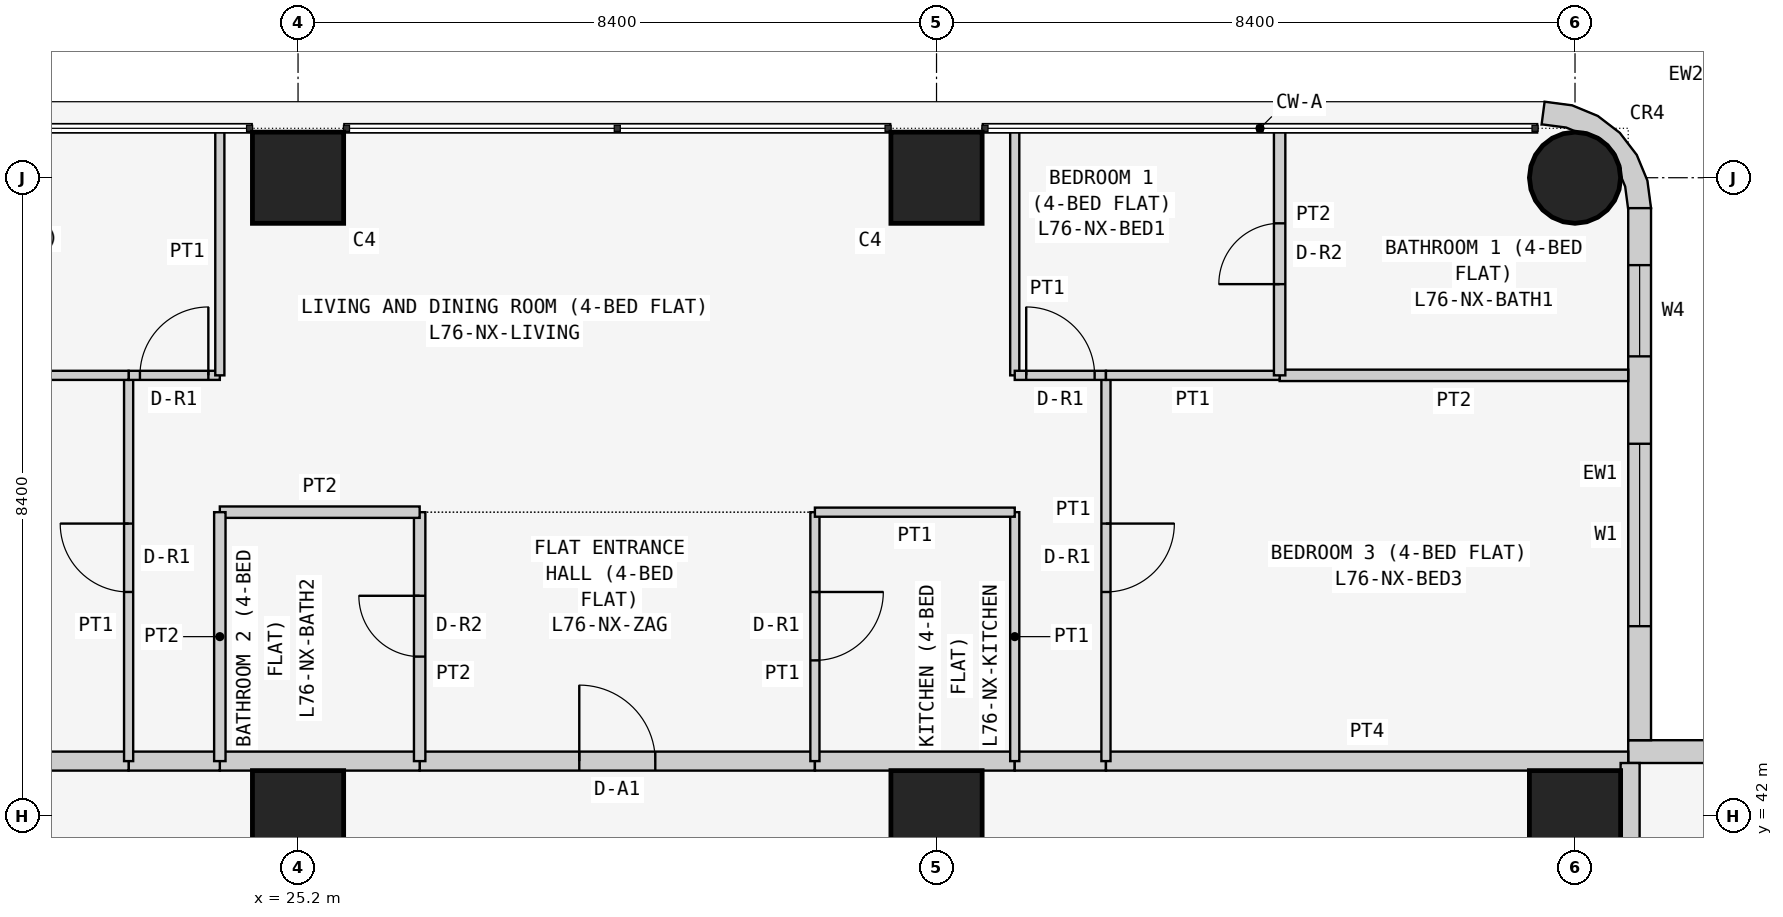
"""IFC4 building model, lengths in metres.
Left out: names, types, materials, properties, quantities, classifications, styles, units other than length and angle.
Written with IfcOpenShell. Run it as: python <this file> out.ifc"""

import sys

from ifc_helpers import new_model, si_unit, direction, frame, frame_2d, origin, origin_2d, place, context, subcontext, project, spatial, polyline, rectangle, circle, outline, extrude, element, fill, save


model = new_model("IFC4")
c1 = context("Model", 3, precision=1e-05, world=origin(), true_north=direction((0.0, 1.0)))
c2 = subcontext(c1, "Body", "Model", "MODEL_VIEW")
j1 = project(units=[si_unit("LENGTHUNIT", "METRE"), si_unit("PLANEANGLEUNIT", "RADIAN")], contexts=[c1])
p1 = place(None, origin())
s1 = spatial("IfcSite", under=j1, at=p1, CompositionType="ELEMENT")
p2 = place(p1, origin())
s2 = spatial("IfcBuilding", under=s1, at=p2, CompositionType="ELEMENT")
p3 = place(p2, frame((0.0, 0.0, 290.1)))
s3 = spatial("IfcBuildingStorey", under=s2, at=p3, CompositionType="ELEMENT", Elevation=290.1)
for number, where, z_axis, x_axis in (
    (1, (25.2, 42.0, 0.0), (0.0, 0.0, 1.0), (1.0, 0.0, 0.0)),
    (2, (25.2, 50.4, 0.0), (0.0, 0.0, 1.0), (1.0, 0.0, 0.0)),
    (3, (33.6, 42.0, 0.0), (0.0, 0.0, 1.0), (1.0, 0.0, 0.0)),
    (4, (33.6, 50.4, 0.0), (0.0, 0.0, 1.0), (1.0, 0.0, 0.0)),
    (5, (42.0, 42.0, 0.0), (0.0, 0.0, 1.0), (1.0, 0.0, 0.0)),
):
    element("IfcColumn", number, at=place(p3, frame(where, z_axis=z_axis, x_axis=x_axis)), inside=s3, PredefinedType="COLUMN", context=c2, shape_type="SweptSolid", body=[
        extrude(rectangle(XDim=1.2, YDim=1.2, at=origin_2d()), origin(), (0.0, 0.0, 1.0), 3.6),
    ])
p4 = place(p3, frame((42.0, 50.4, 0.0), z_axis=(0.0, 0.0, 1.0), x_axis=(1.0, 0.0, 0.0)))
e6 = element("IfcColumn", 6, at=p4, inside=s3, PredefinedType="COLUMN", context=c2, shape_type="SweptSolid", body=[
    extrude(circle(Radius=0.6, at=origin_2d()), origin(), (0.0, 0.0, 1.0), 3.6),
])
p5 = place(p3, frame((50.0, 42.85, 0.0), z_axis=(0.0, 0.0, 1.0), x_axis=(-1.0, 0.0, 0.0)))
e7 = element("IfcWall", 7, at=p5, inside=s3, PredefinedType="SOLIDWALL", context=c2, shape_type="SweptSolid", body=[
    extrude(rectangle(XDim=7.3, YDim=0.3, at=frame_2d((3.65, 0.0))), origin(), (0.0, 0.0, 1.0), 3.45),
])
p6 = place(p5, frame((3.1, 0.0, 0.9)))
e8 = element("IfcOpeningElement", 8, at=p6, cuts=e7, PredefinedType="OPENING", context=c2, shape_type="SweptSolid", body=[
    extrude(rectangle(XDim=2.4, YDim=1.5, at=frame_2d((1.2, 0.75))), frame((0.0, 0.16, 0.0), z_axis=(0.0, -1.0, 0.0), x_axis=(1.0, 0.0, 0.0)), (0.0, 0.0, 1.0), 0.32),
])
p7 = place(p5, frame((0.75, 0.0, 0.9)))
e9 = element("IfcOpeningElement", 9, at=p7, cuts=e7, PredefinedType="OPENING", context=c2, shape_type="SweptSolid", body=[
    extrude(rectangle(XDim=1.2, YDim=1.5, at=frame_2d((0.6, 0.75))), frame((0.0, 0.16, 0.0), z_axis=(0.0, -1.0, 0.0), x_axis=(1.0, 0.0, 0.0)), (0.0, 0.0, 1.0), 0.32),
])
p8 = place(p3, frame((42.85, 43.0, 0.0), z_axis=(0.0, 0.0, 1.0), x_axis=(0.0, 1.0, 0.0)))
e10 = element("IfcWall", 10, at=p8, inside=s3, PredefinedType="SOLIDWALL", context=c2, shape_type="SweptSolid", body=[
    extrude(rectangle(XDim=7.0, YDim=0.3, at=frame_2d((3.5, 0.0))), origin(), (0.0, 0.0, 1.0), 3.45),
])
p9 = place(p8, frame((1.5, 0.0, 0.9)))
e11 = element("IfcOpeningElement", 11, at=p9, cuts=e10, PredefinedType="OPENING", context=c2, shape_type="SweptSolid", body=[
    extrude(rectangle(XDim=2.4, YDim=1.5, at=frame_2d((1.2, 0.75))), frame((0.0, 0.16, 0.0), z_axis=(0.0, -1.0, 0.0), x_axis=(1.0, 0.0, 0.0)), (0.0, 0.0, 1.0), 0.32),
])
p10 = place(p8, frame((5.05, 0.0, 0.9)))
e12 = element("IfcOpeningElement", 12, at=p10, cuts=e10, PredefinedType="OPENING", context=c2, shape_type="SweptSolid", body=[
    extrude(rectangle(XDim=1.2, YDim=1.5, at=frame_2d((0.6, 0.75))), frame((0.0, 0.16, 0.0), z_axis=(0.0, -1.0, 0.0), x_axis=(1.0, 0.0, 0.0)), (0.0, 0.0, 1.0), 0.32),
])
p11 = place(p3, frame((42.576, 50.038, 0.0), z_axis=(0.0, 0.0, 1.0), x_axis=(0.707106781187, 0.707106781187, 0.0)))
e13 = element("IfcWall", 13, at=p11, inside=s3, PredefinedType="SOLIDWALL", context=c2, shape_type="SweptSolid", body=[
    extrude(outline(polyline([(0.233, 0.114), (0.047, -0.129), (0.033, -0.143), (0.273, -0.327), (0.495, -0.037), (0.635, 0.3), (0.683, 0.663), (0.635, 1.025), (0.495, 1.363), (0.273, 1.653), (0.033, 1.469), (0.047, 1.455), (0.233, 1.212), (0.292, 1.069), (0.358, 1.003), (0.449, 0.782), (0.449, 0.543), (0.358, 0.322), (0.292, 0.257), (0.233, 0.114)])), origin(), (0.0, 0.0, 1.0), 3.45),
])
p12 = place(p3, frame((26.8, 42.725, 0.0), z_axis=(0.0, 0.0, 1.0), x_axis=(1.0, 0.0, 0.0)))
e14 = element("IfcWall", 14, at=p12, inside=s3, PredefinedType="PARTITIONING", context=c2, shape_type="SweptSolid", body=[
    extrude(rectangle(XDim=5.2, YDim=0.25, at=frame_2d((2.6, 0.0))), origin(), (0.0, 0.0, 1.0), 3.45),
])
p13 = place(p12, frame((2.1, 0.0, 0.0)))
e15 = element("IfcOpeningElement", 15, at=p13, cuts=e14, PredefinedType="OPENING", context=c2, shape_type="SweptSolid", body=[
    extrude(rectangle(XDim=1.0, YDim=2.1, at=frame_2d((0.5, 1.05))), frame((0.0, 0.135, 0.0), z_axis=(0.0, -1.0, 0.0), x_axis=(1.0, 0.0, 0.0)), (0.0, 0.0, 1.0), 0.27),
])
p14 = place(p3, frame((24.171, 42.725, 0.0), z_axis=(0.0, 0.0, 1.0), x_axis=(1.0, 0.0, 0.0)))
e16 = element("IfcWall", 16, at=p14, inside=s3, PredefinedType="PARTITIONING", context=c2, shape_type="SweptSolid", body=[
    extrude(rectangle(XDim=2.629, YDim=0.25, at=frame_2d((1.314, 0.0))), origin(), (0.0, 0.0, 1.0), 3.45),
])
p15 = place(p3, frame((32.0, 42.725, 0.0), z_axis=(0.0, 0.0, 1.0), x_axis=(1.0, 0.0, 0.0)))
e17 = element("IfcWall", 17, at=p15, inside=s3, PredefinedType="PARTITIONING", context=c2, shape_type="SweptSolid", body=[
    extrude(rectangle(XDim=2.629, YDim=0.25, at=frame_2d((1.314, 0.0))), origin(), (0.0, 0.0, 1.0), 3.45),
])
p16 = place(p3, frame((22.971, 42.725, 0.0), z_axis=(0.0, 0.0, 1.0), x_axis=(1.0, 0.0, 0.0)))
e18 = element("IfcWall", 18, at=p16, inside=s3, PredefinedType="PARTITIONING", context=c2, shape_type="SweptSolid", body=[
    extrude(rectangle(XDim=1.2, YDim=0.25, at=frame_2d((0.6, 0.0))), origin(), (0.0, 0.0, 1.0), 3.45),
])
p17 = place(p3, frame((34.629, 42.725, 0.0), z_axis=(0.0, 0.0, 1.0), x_axis=(1.0, 0.0, 0.0)))
e19 = element("IfcWall", 19, at=p17, inside=s3, PredefinedType="PARTITIONING", context=c2, shape_type="SweptSolid", body=[
    extrude(rectangle(XDim=1.2, YDim=0.25, at=frame_2d((0.6, 0.0))), origin(), (0.0, 0.0, 1.0), 3.45),
])
for number, where, z_axis, x_axis in (
    (20, (16.1, 42.725, 0.0), (0.0, 0.0, 1.0), (1.0, 0.0, 0.0)),
    (21, (35.829, 42.725, 0.0), (0.0, 0.0, 1.0), (1.0, 0.0, 0.0)),
):
    element("IfcWall", number, at=place(p3, frame(where, z_axis=z_axis, x_axis=x_axis)), inside=s3, PredefinedType="PARTITIONING", context=c2, shape_type="SweptSolid", body=[
        extrude(rectangle(XDim=6.871, YDim=0.25, at=frame_2d((3.436, 0.0))), origin(), (0.0, 0.0, 1.0), 3.45),
    ])
p18 = place(p3, frame((42.725, 42.7, 0.0), z_axis=(0.0, 0.0, 1.0), x_axis=(0.0, -1.0, 0.0)))
e22 = element("IfcWall", 22, at=p18, inside=s3, PredefinedType="PARTITIONING", context=c2, shape_type="SweptSolid", body=[
    extrude(rectangle(XDim=4.586, YDim=0.25, at=frame_2d((2.293, 0.0))), origin(), (0.0, 0.0, 1.0), 3.45),
])
p19 = place(p3, frame((26.8, 46.0, 0.0), z_axis=(0.0, 0.0, 1.0), x_axis=(0.0, -1.0, 0.0)))
e23 = element("IfcWall", 23, at=p19, inside=s3, PredefinedType="PARTITIONING", context=c2, shape_type="SweptSolid", body=[
    extrude(rectangle(XDim=3.275, YDim=0.15, at=frame_2d((1.637, 0.0))), origin(), (0.0, 0.0, 1.0), 3.45),
])
p20 = place(p19, frame((1.1, 0.0, 0.0)))
e24 = element("IfcOpeningElement", 24, at=p20, cuts=e23, PredefinedType="OPENING", context=c2, shape_type="SweptSolid", body=[
    extrude(rectangle(XDim=0.8, YDim=2.1, at=frame_2d((0.4, 1.05))), frame((0.0, 0.085, 0.0), z_axis=(0.0, -1.0, 0.0), x_axis=(1.0, 0.0, 0.0)), (0.0, 0.0, 1.0), 0.17),
])
p21 = place(p3, frame((32.0, 42.725, 0.0), z_axis=(0.0, 0.0, 1.0), x_axis=(0.0, 1.0, 0.0)))
e25 = element("IfcWall", 25, at=p21, inside=s3, PredefinedType="PARTITIONING", context=c2, shape_type="SweptSolid", body=[
    extrude(rectangle(XDim=3.275, YDim=0.12, at=frame_2d((1.637, 0.0))), origin(), (0.0, 0.0, 1.0), 3.45),
])
p22 = place(p21, frame((1.325, 0.0, 0.0)))
e26 = element("IfcOpeningElement", 26, at=p22, cuts=e25, PredefinedType="OPENING", context=c2, shape_type="SweptSolid", body=[
    extrude(rectangle(XDim=0.9, YDim=2.1, at=frame_2d((0.45, 1.05))), frame((0.0, 0.07, 0.0), z_axis=(0.0, -1.0, 0.0), x_axis=(1.0, 0.0, 0.0)), (0.0, 0.0, 1.0), 0.14),
])
p23 = place(p3, frame((26.8, 46.0, 0.0), z_axis=(0.0, 0.0, 1.0), x_axis=(-1.0, 0.0, 0.0)))
e27 = element("IfcWall", 27, at=p23, inside=s3, PredefinedType="PARTITIONING", context=c2, shape_type="SweptSolid", body=[
    extrude(rectangle(XDim=2.629, YDim=0.15, at=frame_2d((1.314, 0.0))), origin(), (0.0, 0.0, 1.0), 3.45),
])
p24 = place(p3, frame((24.171, 46.0, 0.0), z_axis=(0.0, 0.0, 1.0), x_axis=(0.0, -1.0, 0.0)))
e28 = element("IfcWall", 28, at=p24, inside=s3, PredefinedType="PARTITIONING", context=c2, shape_type="SweptSolid", body=[
    extrude(rectangle(XDim=3.275, YDim=0.15, at=frame_2d((1.637, 0.0))), origin(), (0.0, 0.0, 1.0), 3.45),
])
p25 = place(p3, frame((34.629, 42.725, 0.0), z_axis=(0.0, 0.0, 1.0), x_axis=(0.0, 1.0, 0.0)))
e29 = element("IfcWall", 29, at=p25, inside=s3, PredefinedType="PARTITIONING", context=c2, shape_type="SweptSolid", body=[
    extrude(rectangle(XDim=3.275, YDim=0.12, at=frame_2d((1.637, 0.0))), origin(), (0.0, 0.0, 1.0), 3.45),
])
p26 = place(p3, frame((34.629, 46.0, 0.0), z_axis=(0.0, 0.0, 1.0), x_axis=(-1.0, 0.0, 0.0)))
e30 = element("IfcWall", 30, at=p26, inside=s3, PredefinedType="PARTITIONING", context=c2, shape_type="SweptSolid", body=[
    extrude(rectangle(XDim=2.629, YDim=0.12, at=frame_2d((1.314, 0.0))), origin(), (0.0, 0.0, 1.0), 3.45),
])
p27 = place(p3, frame((22.971, 42.725, 0.0), z_axis=(0.0, 0.0, 1.0), x_axis=(0.0, 1.0, 0.0)))
e31 = element("IfcWall", 31, at=p27, inside=s3, PredefinedType="PARTITIONING", context=c2, shape_type="SweptSolid", body=[
    extrude(rectangle(XDim=5.075, YDim=0.12, at=frame_2d((2.538, 0.0))), origin(), (0.0, 0.0, 1.0), 3.45),
])
p28 = place(p27, frame((2.225, 0.0, 0.0)))
e32 = element("IfcOpeningElement", 32, at=p28, cuts=e31, PredefinedType="OPENING", context=c2, shape_type="SweptSolid", body=[
    extrude(rectangle(XDim=0.9, YDim=2.1, at=frame_2d((0.45, 1.05))), frame((0.0, 0.07, 0.0), z_axis=(0.0, -1.0, 0.0), x_axis=(1.0, 0.0, 0.0)), (0.0, 0.0, 1.0), 0.14),
])
p29 = place(p3, frame((22.971, 47.8, 0.0), z_axis=(0.0, 0.0, 1.0), x_axis=(1.0, 0.0, 0.0)))
e33 = element("IfcWall", 33, at=p29, inside=s3, PredefinedType="PARTITIONING", context=c2, shape_type="SweptSolid", body=[
    extrude(rectangle(XDim=1.2, YDim=0.12, at=frame_2d((0.6, 0.0))), origin(), (0.0, 0.0, 1.0), 3.45),
])
p30 = place(p29, frame((0.149, 0.0, 0.0)))
e34 = element("IfcOpeningElement", 34, at=p30, cuts=e33, PredefinedType="OPENING", context=c2, shape_type="SweptSolid", body=[
    extrude(rectangle(XDim=0.9, YDim=2.1, at=frame_2d((0.45, 1.05))), frame((0.0, 0.07, 0.0), z_axis=(0.0, -1.0, 0.0), x_axis=(1.0, 0.0, 0.0)), (0.0, 0.0, 1.0), 0.14),
])
p31 = place(p3, frame((24.171, 47.8, 0.0), z_axis=(0.0, 0.0, 1.0), x_axis=(0.0, 1.0, 0.0)))
e35 = element("IfcWall", 35, at=p31, inside=s3, PredefinedType="PARTITIONING", context=c2, shape_type="SweptSolid", body=[
    extrude(rectangle(XDim=3.25, YDim=0.12, at=frame_2d((1.625, 0.0))), origin(), (0.0, 0.0, 1.0), 3.45),
])
p32 = place(p3, frame((35.829, 47.8, 0.0), z_axis=(0.0, 0.0, 1.0), x_axis=(0.0, -1.0, 0.0)))
e36 = element("IfcWall", 36, at=p32, inside=s3, PredefinedType="PARTITIONING", context=c2, shape_type="SweptSolid", body=[
    extrude(rectangle(XDim=5.075, YDim=0.12, at=frame_2d((2.538, 0.0))), origin(), (0.0, 0.0, 1.0), 3.45),
])
p33 = place(p32, frame((1.95, 0.0, 0.0)))
e37 = element("IfcOpeningElement", 37, at=p33, cuts=e36, PredefinedType="OPENING", context=c2, shape_type="SweptSolid", body=[
    extrude(rectangle(XDim=0.9, YDim=2.1, at=frame_2d((0.45, 1.05))), frame((0.0, 0.07, 0.0), z_axis=(0.0, -1.0, 0.0), x_axis=(1.0, 0.0, 0.0)), (0.0, 0.0, 1.0), 0.14),
])
p34 = place(p3, frame((34.629, 51.05, 0.0), z_axis=(0.0, 0.0, 1.0), x_axis=(0.0, -1.0, 0.0)))
e38 = element("IfcWall", 38, at=p34, inside=s3, PredefinedType="PARTITIONING", context=c2, shape_type="SweptSolid", body=[
    extrude(rectangle(XDim=3.25, YDim=0.12, at=frame_2d((1.625, 0.0))), origin(), (0.0, 0.0, 1.0), 3.45),
])
p35 = place(p3, frame((34.629, 47.8, 0.0), z_axis=(0.0, 0.0, 1.0), x_axis=(1.0, 0.0, 0.0)))
e39 = element("IfcWall", 39, at=p35, inside=s3, PredefinedType="PARTITIONING", context=c2, shape_type="SweptSolid", body=[
    extrude(rectangle(XDim=1.2, YDim=0.12, at=frame_2d((0.6, 0.0))), origin(), (0.0, 0.0, 1.0), 3.45),
])
p36 = place(p35, frame((0.151, 0.0, 0.0)))
e40 = element("IfcOpeningElement", 40, at=p36, cuts=e39, PredefinedType="OPENING", context=c2, shape_type="SweptSolid", body=[
    extrude(rectangle(XDim=0.9, YDim=2.1, at=frame_2d((0.45, 1.05))), frame((0.0, 0.07, 0.0), z_axis=(0.0, -1.0, 0.0), x_axis=(1.0, 0.0, 0.0)), (0.0, 0.0, 1.0), 0.14),
])
p37 = place(p3, frame((22.971, 47.8, 0.0), z_axis=(0.0, 0.0, 1.0), x_axis=(-1.0, 0.0, 0.0)))
e41 = element("IfcWall", 41, at=p37, inside=s3, PredefinedType="PARTITIONING", context=c2, shape_type="SweptSolid", body=[
    extrude(rectangle(XDim=6.871, YDim=0.12, at=frame_2d((3.436, 0.0))), origin(), (0.0, 0.0, 1.0), 3.45),
])
p38 = place(p3, frame((42.7, 47.8, 0.0), z_axis=(0.0, 0.0, 1.0), x_axis=(-1.0, 0.0, 0.0)))
e42 = element("IfcWall", 42, at=p38, inside=s3, PredefinedType="PARTITIONING", context=c2, shape_type="SweptSolid", body=[
    extrude(rectangle(XDim=4.586, YDim=0.15, at=frame_2d((2.293, 0.0))), origin(), (0.0, 0.0, 1.0), 3.45),
])
p39 = place(p3, frame((38.114, 47.8, 0.0), z_axis=(0.0, 0.0, 1.0), x_axis=(-1.0, 0.0, 0.0)))
e43 = element("IfcWall", 43, at=p39, inside=s3, PredefinedType="PARTITIONING", context=c2, shape_type="SweptSolid", body=[
    extrude(rectangle(XDim=2.285, YDim=0.12, at=frame_2d((1.143, 0.0))), origin(), (0.0, 0.0, 1.0), 3.45),
])
p40 = place(p3, frame((38.114, 51.05, 0.0), z_axis=(0.0, 0.0, 1.0), x_axis=(0.0, -1.0, 0.0)))
e44 = element("IfcWall", 44, at=p40, inside=s3, PredefinedType="PARTITIONING", context=c2, shape_type="SweptSolid", body=[
    extrude(rectangle(XDim=3.25, YDim=0.15, at=frame_2d((1.625, 0.0))), origin(), (0.0, 0.0, 1.0), 3.45),
])
p41 = place(p40, frame((1.25, 0.0, 0.0)))
e45 = element("IfcOpeningElement", 45, at=p41, cuts=e44, PredefinedType="OPENING", context=c2, shape_type="SweptSolid", body=[
    extrude(rectangle(XDim=0.8, YDim=2.1, at=frame_2d((0.4, 1.05))), frame((0.0, 0.085, 0.0), z_axis=(0.0, -1.0, 0.0), x_axis=(1.0, 0.0, 0.0)), (0.0, 0.0, 1.0), 0.17),
])
p42 = place(p9, origin())
e46 = element("IfcWindow", 46, at=p42, inside=s3, PartitioningType="SINGLE_PANEL", PredefinedType="WINDOW", context=c2, shape_type="SweptSolid", body=[
    extrude(rectangle(XDim=2.4, YDim=1.5, at=frame_2d((1.2, 0.75))), frame((0.0, 0.03, 0.0), z_axis=(0.0, -1.0, 0.0), x_axis=(1.0, 0.0, 0.0)), (0.0, 0.0, 1.0), 0.06),
])
fill(e11, e46)
p43 = place(p10, origin())
e47 = element("IfcWindow", 47, at=p43, inside=s3, PartitioningType="SINGLE_PANEL", PredefinedType="WINDOW", context=c2, shape_type="SweptSolid", body=[
    extrude(rectangle(XDim=1.2, YDim=1.5, at=frame_2d((0.6, 0.75))), frame((0.0, 0.03, 0.0), z_axis=(0.0, -1.0, 0.0), x_axis=(1.0, 0.0, 0.0)), (0.0, 0.0, 1.0), 0.06),
])
fill(e12, e47)
p44 = place(p13, origin())
e48 = element("IfcDoor", 48, at=p44, inside=s3, OperationType="SINGLE_SWING_LEFT", PredefinedType="DOOR", context=c2, shape_type="SweptSolid", body=[
    extrude(rectangle(XDim=1.0, YDim=2.1, at=frame_2d((0.5, 1.05))), frame((0.0, 0.025, 0.0), z_axis=(0.0, -1.0, 0.0), x_axis=(1.0, 0.0, 0.0)), (0.0, 0.0, 1.0), 0.05),
])
fill(e15, e48)
p45 = place(p20, frame((0.8, 0.0, 0.0), z_axis=(0.0, 0.0, 1.0), x_axis=(-1.0, 0.0, 0.0)))
e49 = element("IfcDoor", 49, at=p45, inside=s3, OperationType="SINGLE_SWING_RIGHT", PredefinedType="DOOR", context=c2, shape_type="SweptSolid", body=[
    extrude(rectangle(XDim=0.8, YDim=2.1, at=frame_2d((0.4, 1.05))), frame((0.0, 0.025, 0.0), z_axis=(0.0, -1.0, 0.0), x_axis=(1.0, 0.0, 0.0)), (0.0, 0.0, 1.0), 0.05),
])
fill(e24, e49)
p46 = place(p22, frame((0.9, 0.0, 0.0), z_axis=(0.0, 0.0, 1.0), x_axis=(-1.0, 0.0, 0.0)))
e50 = element("IfcDoor", 50, at=p46, inside=s3, OperationType="SINGLE_SWING_LEFT", PredefinedType="DOOR", context=c2, shape_type="SweptSolid", body=[
    extrude(rectangle(XDim=0.9, YDim=2.1, at=frame_2d((0.45, 1.05))), frame((0.0, 0.025, 0.0), z_axis=(0.0, -1.0, 0.0), x_axis=(1.0, 0.0, 0.0)), (0.0, 0.0, 1.0), 0.05),
])
fill(e26, e50)
p47 = place(p28, origin())
e51 = element("IfcDoor", 51, at=p47, inside=s3, OperationType="SINGLE_SWING_RIGHT", PredefinedType="DOOR", context=c2, shape_type="SweptSolid", body=[
    extrude(rectangle(XDim=0.9, YDim=2.1, at=frame_2d((0.45, 1.05))), frame((0.0, 0.025, 0.0), z_axis=(0.0, -1.0, 0.0), x_axis=(1.0, 0.0, 0.0)), (0.0, 0.0, 1.0), 0.05),
])
fill(e32, e51)
p48 = place(p30, origin())
e52 = element("IfcDoor", 52, at=p48, inside=s3, OperationType="SINGLE_SWING_RIGHT", PredefinedType="DOOR", context=c2, shape_type="SweptSolid", body=[
    extrude(rectangle(XDim=0.9, YDim=2.1, at=frame_2d((0.45, 1.05))), frame((0.0, 0.025, 0.0), z_axis=(0.0, -1.0, 0.0), x_axis=(1.0, 0.0, 0.0)), (0.0, 0.0, 1.0), 0.05),
])
fill(e34, e52)
p49 = place(p33, origin())
e53 = element("IfcDoor", 53, at=p49, inside=s3, OperationType="SINGLE_SWING_LEFT", PredefinedType="DOOR", context=c2, shape_type="SweptSolid", body=[
    extrude(rectangle(XDim=0.9, YDim=2.1, at=frame_2d((0.45, 1.05))), frame((0.0, 0.025, 0.0), z_axis=(0.0, -1.0, 0.0), x_axis=(1.0, 0.0, 0.0)), (0.0, 0.0, 1.0), 0.05),
])
fill(e37, e53)
p50 = place(p36, origin())
e54 = element("IfcDoor", 54, at=p50, inside=s3, OperationType="SINGLE_SWING_LEFT", PredefinedType="DOOR", context=c2, shape_type="SweptSolid", body=[
    extrude(rectangle(XDim=0.9, YDim=2.1, at=frame_2d((0.45, 1.05))), frame((0.0, 0.025, 0.0), z_axis=(0.0, -1.0, 0.0), x_axis=(1.0, 0.0, 0.0)), (0.0, 0.0, 1.0), 0.05),
])
fill(e40, e54)
p51 = place(p41, frame((0.8, 0.0, 0.0), z_axis=(0.0, 0.0, 1.0), x_axis=(-1.0, 0.0, 0.0)))
e55 = element("IfcDoor", 55, at=p51, inside=s3, OperationType="SINGLE_SWING_LEFT", PredefinedType="DOOR", context=c2, shape_type="SweptSolid", body=[
    extrude(rectangle(XDim=0.8, YDim=2.1, at=frame_2d((0.4, 1.05))), frame((0.0, 0.025, 0.0), z_axis=(0.0, -1.0, 0.0), x_axis=(1.0, 0.0, 0.0)), (0.0, 0.0, 1.0), 0.05),
])
fill(e45, e55)
save(model, sys.argv[1])
